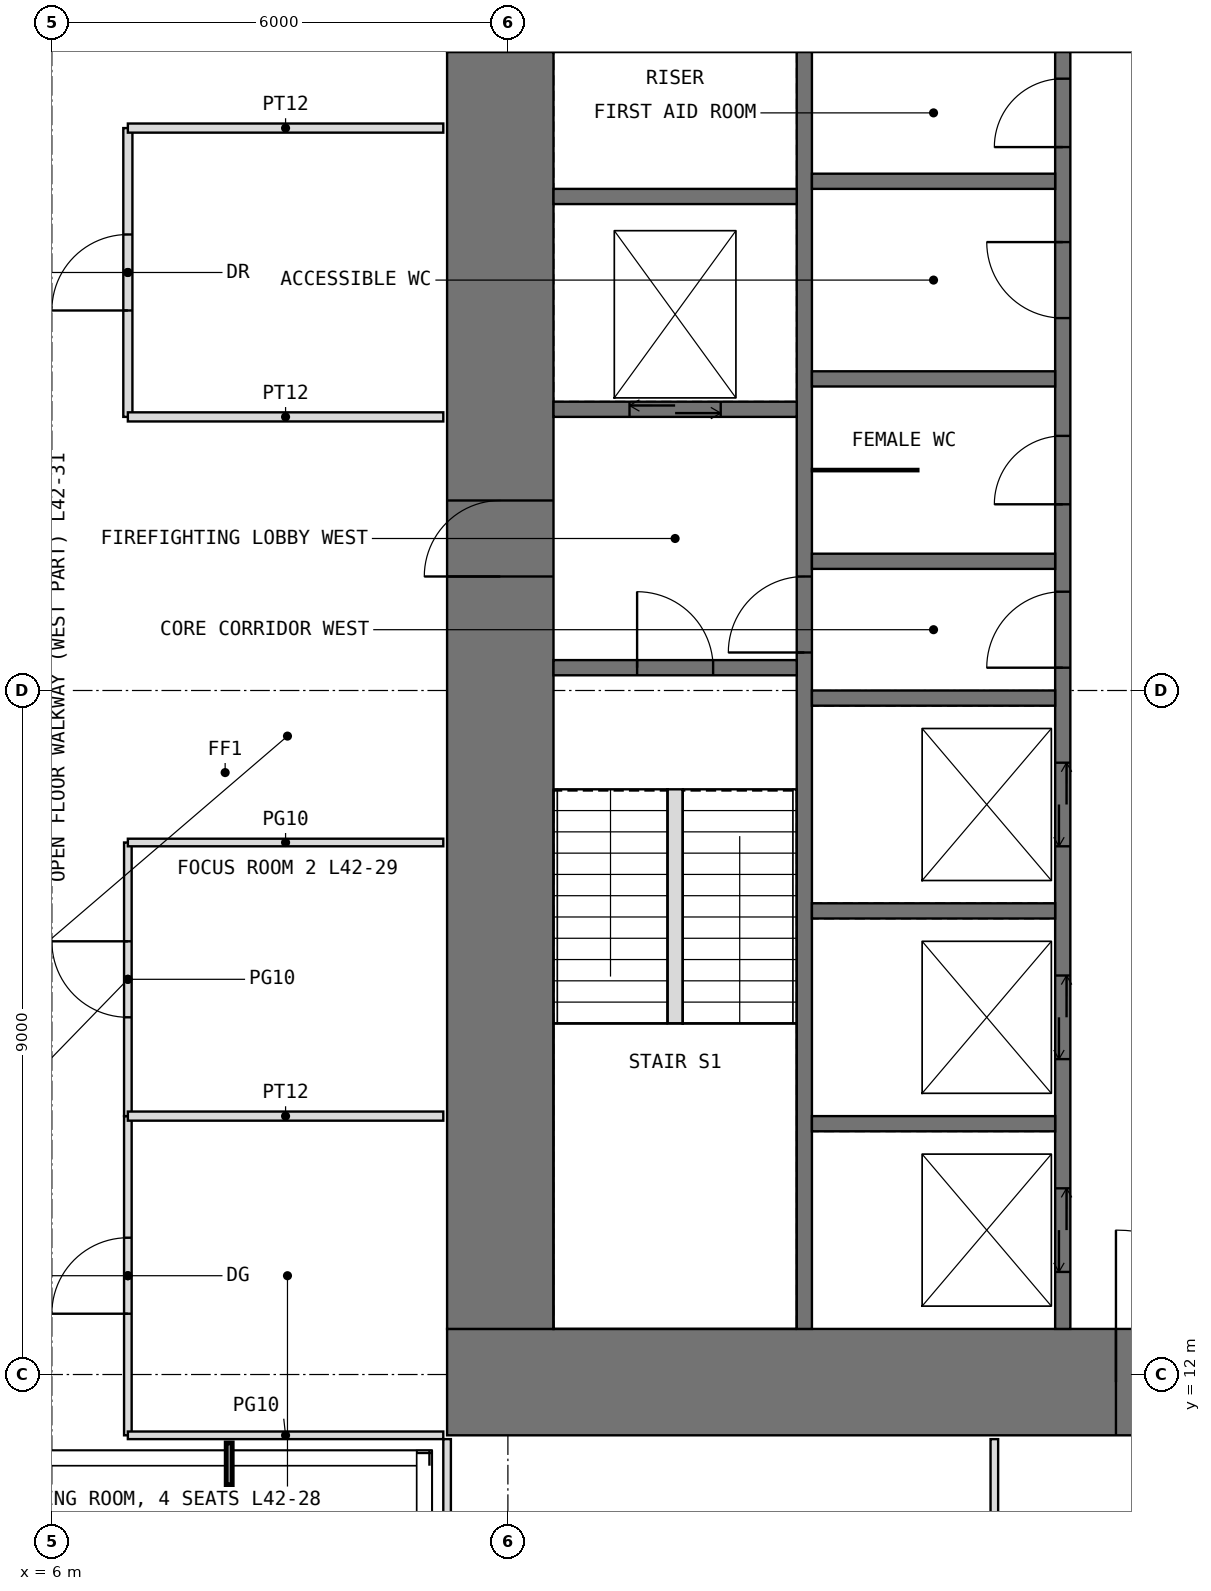
"""IFC4 building model, lengths in metres.
Left out: names, types, materials, properties, quantities, classifications, styles, units other than length and angle.
Written with IfcOpenShell. Run it as: python <this file> out.ifc"""

import sys

from ifc_helpers import new_model, si_unit, direction, frame, frame_2d, origin, place, context, subcontext, project, spatial, rectangle, extrude, element, fill, save


model = new_model("IFC4")
c1 = context("Model", 3, precision=1e-05, world=origin(), true_north=direction((0.0, 1.0)))
c2 = subcontext(c1, "Body", "Model", "MODEL_VIEW")
j1 = project(units=[si_unit("LENGTHUNIT", "METRE"), si_unit("PLANEANGLEUNIT", "RADIAN")], contexts=[c1])
p1 = place(None, origin())
s1 = spatial("IfcSite", under=j1, at=p1, CompositionType="ELEMENT")
p2 = place(p1, origin())
s2 = spatial("IfcBuilding", under=s1, at=p2, CompositionType="ELEMENT")
p3 = place(p2, frame((0.0, 0.0, 178.5)))
s3 = spatial("IfcBuildingStorey", under=s2, at=p3, CompositionType="ELEMENT", Elevation=178.5)
p4 = place(p3, frame((11.2, 11.9, -0.05), z_axis=(0.0, 0.0, 1.0), x_axis=(1.0, 0.0, 0.0)))
e1 = element("IfcWall", 1, at=p4, inside=s3, PredefinedType="SHEAR", context=c2, shape_type="SweptSolid", body=[
    extrude(rectangle(XDim=19.6, YDim=1.4, at=frame_2d((9.8, 0.0))), origin(), (0.0, 0.0, 1.0), 4.0),
])
p5 = place(p4, frame((8.8, 0.0, 0.05)))
e2 = element("IfcOpeningElement", 2, at=p5, cuts=e1, PredefinedType="OPENING", context=c2, shape_type="SweptSolid", body=[
    extrude(rectangle(XDim=2.0, YDim=2.2, at=frame_2d((1.0, 1.1))), frame((0.0, 0.71, 0.0), z_axis=(0.0, -1.0, 0.0), x_axis=(1.0, 0.0, 0.0)), (0.0, 0.0, 1.0), 1.42),
])
p6 = place(p3, frame((11.9, 12.6, -0.05), z_axis=(0.0, 0.0, 1.0), x_axis=(0.0, 1.0, 0.0)))
e3 = element("IfcWall", 3, at=p6, inside=s3, PredefinedType="SHEAR", context=c2, shape_type="SweptSolid", body=[
    extrude(rectangle(XDim=16.8, YDim=1.4, at=frame_2d((8.4, 0.0))), origin(), (0.0, 0.0, 1.0), 4.0),
])
p7 = place(p6, frame((9.9, 0.0, 0.05)))
e4 = element("IfcOpeningElement", 4, at=p7, cuts=e3, PredefinedType="OPENING", context=c2, shape_type="SweptSolid", body=[
    extrude(rectangle(XDim=1.0, YDim=2.2, at=frame_2d((0.5, 1.1))), frame((0.0, 0.71, 0.0), z_axis=(0.0, -1.0, 0.0), x_axis=(1.0, 0.0, 0.0)), (0.0, 0.0, 1.0), 1.42),
])
p8 = place(p3, frame((15.9, 12.6, -0.05), z_axis=(0.0, 0.0, 1.0), x_axis=(0.0, 1.0, 0.0)))
e5 = element("IfcWall", 5, at=p8, inside=s3, PredefinedType="SHEAR", context=c2, shape_type="SweptSolid", body=[
    extrude(rectangle(XDim=16.8, YDim=0.2, at=frame_2d((8.4, 0.0))), origin(), (0.0, 0.0, 1.0), 4.0),
])
p9 = place(p8, frame((8.9, 0.0, 0.05)))
e6 = element("IfcOpeningElement", 6, at=p9, cuts=e5, PredefinedType="OPENING", context=c2, shape_type="SweptSolid", body=[
    extrude(rectangle(XDim=1.0, YDim=2.2, at=frame_2d((0.5, 1.1))), frame((0.0, 0.11, 0.0), z_axis=(0.0, -1.0, 0.0), x_axis=(1.0, 0.0, 0.0)), (0.0, 0.0, 1.0), 0.22),
])
p10 = place(p3, frame((19.3, 12.6, -0.05), z_axis=(0.0, 0.0, 1.0), x_axis=(0.0, 1.0, 0.0)))
e7 = element("IfcWall", 7, at=p10, inside=s3, PredefinedType="SHEAR", context=c2, shape_type="SweptSolid", body=[
    extrude(rectangle(XDim=16.8, YDim=0.2, at=frame_2d((8.4, 0.0))), origin(), (0.0, 0.0, 1.0), 4.0),
])
p11 = place(p10, frame((8.7, 0.0, 0.05)))
e8 = element("IfcOpeningElement", 8, at=p11, cuts=e7, PredefinedType="OPENING", context=c2, shape_type="SweptSolid", body=[
    extrude(rectangle(XDim=1.0, YDim=2.2, at=frame_2d((0.5, 1.1))), frame((0.0, 0.11, 0.0), z_axis=(0.0, -1.0, 0.0), x_axis=(1.0, 0.0, 0.0)), (0.0, 0.0, 1.0), 0.22),
])
p12 = place(p10, frame((10.85, 0.0, 0.05)))
e9 = element("IfcOpeningElement", 9, at=p12, cuts=e7, PredefinedType="OPENING", context=c2, shape_type="SweptSolid", body=[
    extrude(rectangle(XDim=0.9, YDim=2.2, at=frame_2d((0.45, 1.1))), frame((0.0, 0.11, 0.0), z_axis=(0.0, -1.0, 0.0), x_axis=(1.0, 0.0, 0.0)), (0.0, 0.0, 1.0), 0.22),
])
p13 = place(p10, frame((13.3, 0.0, 0.05)))
e10 = element("IfcOpeningElement", 10, at=p13, cuts=e7, PredefinedType="OPENING", context=c2, shape_type="SweptSolid", body=[
    extrude(rectangle(XDim=1.0, YDim=2.2, at=frame_2d((0.5, 1.1))), frame((0.0, 0.11, 0.0), z_axis=(0.0, -1.0, 0.0), x_axis=(1.0, 0.0, 0.0)), (0.0, 0.0, 1.0), 0.22),
])
p14 = place(p10, frame((15.55, 0.0, 0.05)))
e11 = element("IfcOpeningElement", 11, at=p14, cuts=e7, PredefinedType="OPENING", context=c2, shape_type="SweptSolid", body=[
    extrude(rectangle(XDim=0.9, YDim=2.2, at=frame_2d((0.45, 1.1))), frame((0.0, 0.11, 0.0), z_axis=(0.0, -1.0, 0.0), x_axis=(1.0, 0.0, 0.0)), (0.0, 0.0, 1.0), 0.22),
])
p15 = place(p10, frame((0.75, 0.0, 0.05)))
e12 = element("IfcOpeningElement", 12, at=p15, cuts=e7, PredefinedType="OPENING", context=c2, shape_type="SweptSolid", body=[
    extrude(rectangle(XDim=1.1, YDim=2.2, at=frame_2d((0.55, 1.1))), frame((0.0, 0.11, 0.0), z_axis=(0.0, -1.0, 0.0), x_axis=(1.0, 0.0, 0.0)), (0.0, 0.0, 1.0), 0.22),
])
p16 = place(p10, frame((3.55, 0.0, 0.05)))
e13 = element("IfcOpeningElement", 13, at=p16, cuts=e7, PredefinedType="OPENING", context=c2, shape_type="SweptSolid", body=[
    extrude(rectangle(XDim=1.1, YDim=2.2, at=frame_2d((0.55, 1.1))), frame((0.0, 0.11, 0.0), z_axis=(0.0, -1.0, 0.0), x_axis=(1.0, 0.0, 0.0)), (0.0, 0.0, 1.0), 0.22),
])
p17 = place(p10, frame((6.35, 0.0, 0.05)))
e14 = element("IfcOpeningElement", 14, at=p17, cuts=e7, PredefinedType="OPENING", context=c2, shape_type="SweptSolid", body=[
    extrude(rectangle(XDim=1.1, YDim=2.2, at=frame_2d((0.55, 1.1))), frame((0.0, 0.11, 0.0), z_axis=(0.0, -1.0, 0.0), x_axis=(1.0, 0.0, 0.0)), (0.0, 0.0, 1.0), 0.22),
])
p18 = place(p3, frame((12.6, 21.3, -0.05), z_axis=(0.0, 0.0, 1.0), x_axis=(1.0, 0.0, 0.0)))
e15 = element("IfcWall", 15, at=p18, inside=s3, PredefinedType="SHEAR", context=c2, shape_type="SweptSolid", body=[
    extrude(rectangle(XDim=3.2, YDim=0.2, at=frame_2d((1.6, 0.0))), origin(), (0.0, 0.0, 1.0), 4.0),
])
p19 = place(p18, frame((1.1, 0.0, 0.05)))
e16 = element("IfcOpeningElement", 16, at=p19, cuts=e15, PredefinedType="OPENING", context=c2, shape_type="SweptSolid", body=[
    extrude(rectangle(XDim=1.0, YDim=2.2, at=frame_2d((0.5, 1.1))), frame((0.0, 0.11, 0.0), z_axis=(0.0, -1.0, 0.0), x_axis=(1.0, 0.0, 0.0)), (0.0, 0.0, 1.0), 0.22),
])
p20 = place(p3, frame((12.6, 24.7, -0.05), z_axis=(0.0, 0.0, 1.0), x_axis=(1.0, 0.0, 0.0)))
e17 = element("IfcWall", 17, at=p20, inside=s3, PredefinedType="SHEAR", context=c2, shape_type="SweptSolid", body=[
    extrude(rectangle(XDim=3.2, YDim=0.2, at=frame_2d((1.6, 0.0))), origin(), (0.0, 0.0, 1.0), 4.0),
])
p21 = place(p20, frame((1.0, 0.0, 0.05)))
e18 = element("IfcOpeningElement", 18, at=p21, cuts=e17, PredefinedType="OPENING", context=c2, shape_type="SweptSolid", body=[
    extrude(rectangle(XDim=1.2, YDim=2.2, at=frame_2d((0.6, 1.1))), frame((0.0, 0.11, 0.0), z_axis=(0.0, -1.0, 0.0), x_axis=(1.0, 0.0, 0.0)), (0.0, 0.0, 1.0), 0.22),
])
for number, where, z_axis, x_axis in (
    (19, (12.6, 27.5, -0.05), (0.0, 0.0, 1.0), (1.0, 0.0, 0.0)),
    (20, (16.0, 15.3, -0.05), (0.0, 0.0, 1.0), (1.0, 0.0, 0.0)),
    (21, (16.0, 18.1, -0.05), (0.0, 0.0, 1.0), (1.0, 0.0, 0.0)),
    (22, (16.0, 20.9, -0.05), (0.0, 0.0, 1.0), (1.0, 0.0, 0.0)),
    (23, (16.0, 22.7, -0.05), (0.0, 0.0, 1.0), (1.0, 0.0, 0.0)),
    (24, (16.0, 25.1, -0.05), (0.0, 0.0, 1.0), (1.0, 0.0, 0.0)),
    (25, (16.0, 27.7, -0.05), (0.0, 0.0, 1.0), (1.0, 0.0, 0.0)),
):
    element("IfcWall", number, at=place(p3, frame(where, z_axis=z_axis, x_axis=x_axis)), inside=s3, PredefinedType="SHEAR", context=c2, shape_type="SweptSolid", body=[
        extrude(rectangle(XDim=3.2, YDim=0.2, at=frame_2d((1.6, 0.0))), origin(), (0.0, 0.0, 1.0), 4.0),
    ])
p22 = place(p3, frame((16.0, 23.9, 0.0), z_axis=(0.0, 0.0, 1.0), x_axis=(1.0, 0.0, 0.0)))
e26 = element("IfcWall", 26, at=p22, inside=s3, PredefinedType="PARTITIONING", context=c2, shape_type="SweptSolid", body=[
    extrude(rectangle(XDim=1.4, YDim=0.03, at=frame_2d((0.7, 0.0))), origin(), (0.0, 0.0, 1.0), 3.75),
])
p23 = place(p3, frame((7.0, 11.2, 0.0), z_axis=(0.0, 0.0, 1.0), x_axis=(0.0, 1.0, 0.0)))
e27 = element("IfcWall", 27, at=p23, inside=s3, PredefinedType="PARTITIONING", context=c2, shape_type="SweptSolid", body=[
    extrude(rectangle(XDim=4.2, YDim=0.1, at=frame_2d((2.1, 0.0))), origin(), (0.0, 0.0, 1.0), 3.75),
])
p24 = place(p23, frame((1.6, 0.0, 0.0)))
e28 = element("IfcOpeningElement", 28, at=p24, cuts=e27, PredefinedType="OPENING", context=c2, shape_type="SweptSolid", body=[
    extrude(rectangle(XDim=1.0, YDim=2.4, at=frame_2d((0.5, 1.2))), frame((0.0, 0.06, 0.0), z_axis=(0.0, -1.0, 0.0), x_axis=(1.0, 0.0, 0.0)), (0.0, 0.0, 1.0), 0.12),
])
p25 = place(p3, frame((7.0, 11.2, 0.0), z_axis=(0.0, 0.0, 1.0), x_axis=(1.0, 0.0, 0.0)))
e29 = element("IfcWall", 29, at=p25, inside=s3, PredefinedType="PARTITIONING", context=c2, shape_type="SweptSolid", body=[
    extrude(rectangle(XDim=4.15, YDim=0.1, at=frame_2d((2.075, 0.0))), origin(), (0.0, 0.0, 1.0), 3.75),
])
p26 = place(p3, frame((7.0, 15.4, 0.0), z_axis=(0.0, 0.0, 1.0), x_axis=(0.0, 1.0, 0.0)))
e30 = element("IfcWall", 30, at=p26, inside=s3, PredefinedType="PARTITIONING", context=c2, shape_type="SweptSolid", body=[
    extrude(rectangle(XDim=3.6, YDim=0.1, at=frame_2d((1.8, 0.0))), origin(), (0.0, 0.0, 1.0), 3.75),
])
p27 = place(p26, frame((1.3, 0.0, 0.0)))
e31 = element("IfcOpeningElement", 31, at=p27, cuts=e30, PredefinedType="OPENING", context=c2, shape_type="SweptSolid", body=[
    extrude(rectangle(XDim=1.0, YDim=2.4, at=frame_2d((0.5, 1.2))), frame((0.0, 0.06, 0.0), z_axis=(0.0, -1.0, 0.0), x_axis=(1.0, 0.0, 0.0)), (0.0, 0.0, 1.0), 0.12),
])
p28 = place(p3, frame((7.0, 15.4, 0.0), z_axis=(0.0, 0.0, 1.0), x_axis=(1.0, 0.0, 0.0)))
e32 = element("IfcWall", 32, at=p28, inside=s3, PredefinedType="PARTITIONING", context=c2, shape_type="SweptSolid", body=[
    extrude(rectangle(XDim=4.15, YDim=0.12, at=frame_2d((2.075, 0.0))), origin(), (0.0, 0.0, 1.0), 3.75),
])
p29 = place(p3, frame((7.0, 19.0, 0.0), z_axis=(0.0, 0.0, 1.0), x_axis=(1.0, 0.0, 0.0)))
e33 = element("IfcWall", 33, at=p29, inside=s3, PredefinedType="PARTITIONING", context=c2, shape_type="SweptSolid", body=[
    extrude(rectangle(XDim=4.15, YDim=0.1, at=frame_2d((2.075, 0.0))), origin(), (0.0, 0.0, 1.0), 3.75),
])
p30 = place(p3, frame((7.0, 24.6, 0.0), z_axis=(0.0, 0.0, 1.0), x_axis=(0.0, 1.0, 0.0)))
e34 = element("IfcWall", 34, at=p30, inside=s3, PredefinedType="PARTITIONING", context=c2, shape_type="SweptSolid", body=[
    extrude(rectangle(XDim=3.8, YDim=0.12, at=frame_2d((1.9, 0.0))), origin(), (0.0, 0.0, 1.0), 3.75),
])
p31 = place(p30, frame((1.4, 0.0, 0.0)))
e35 = element("IfcOpeningElement", 35, at=p31, cuts=e34, PredefinedType="OPENING", context=c2, shape_type="SweptSolid", body=[
    extrude(rectangle(XDim=1.0, YDim=2.2, at=frame_2d((0.5, 1.1))), frame((0.0, 0.07, 0.0), z_axis=(0.0, -1.0, 0.0), x_axis=(1.0, 0.0, 0.0)), (0.0, 0.0, 1.0), 0.14),
])
for number, where, z_axis, x_axis in (
    (36, (7.0, 24.6, 0.0), (0.0, 0.0, 1.0), (1.0, 0.0, 0.0)),
    (37, (7.0, 28.4, 0.0), (0.0, 0.0, 1.0), (1.0, 0.0, 0.0)),
):
    element("IfcWall", number, at=place(p3, frame(where, z_axis=z_axis, x_axis=x_axis)), inside=s3, PredefinedType="PARTITIONING", context=c2, shape_type="SweptSolid", body=[
        extrude(rectangle(XDim=4.15, YDim=0.12, at=frame_2d((2.075, 0.0))), origin(), (0.0, 0.0, 1.0), 3.75),
    ])
for number, where, z_axis, x_axis in (
    (38, (11.2, 6.2, 0.0), (0.0, 0.0, 1.0), (0.0, 1.0, 0.0)),
    (39, (18.4, 6.2, 0.0), (0.0, 0.0, 1.0), (0.0, 1.0, 0.0)),
):
    element("IfcWall", number, at=place(p3, frame(where, z_axis=z_axis, x_axis=x_axis)), inside=s3, PredefinedType="PARTITIONING", context=c2, shape_type="SweptSolid", body=[
        extrude(rectangle(XDim=4.95, YDim=0.1, at=frame_2d((2.475, 0.0))), origin(), (0.0, 0.0, 1.0), 3.75),
    ])
p32 = place(p3, frame((14.2, 16.62, 0.0), z_axis=(0.0, 0.0, 1.0), x_axis=(0.0, 1.0, 0.0)))
e40 = element("IfcWall", 40, at=p32, inside=s3, PredefinedType="PARTITIONING", context=c2, shape_type="SweptSolid", body=[
    extrude(rectangle(XDim=3.08, YDim=0.2, at=frame_2d((1.54, 0.0))), origin(), (0.0, 0.0, 1.0), 4.0),
])
p33 = place(p5, origin())
e41 = element("IfcDoor", 41, at=p33, inside=s3, OperationType="DOUBLE_DOOR_SINGLE_SWING", PredefinedType="DOOR", context=c2, shape_type="SweptSolid", body=[
    extrude(rectangle(XDim=2.0, YDim=2.2, at=frame_2d((1.0, 1.1))), frame((0.0, 0.025, 0.0), z_axis=(0.0, -1.0, 0.0), x_axis=(1.0, 0.0, 0.0)), (0.0, 0.0, 1.0), 0.05),
])
fill(e2, e41)
p34 = place(p7, origin())
e42 = element("IfcDoor", 42, at=p34, inside=s3, OperationType="SINGLE_SWING_LEFT", PredefinedType="DOOR", context=c2, shape_type="SweptSolid", body=[
    extrude(rectangle(XDim=1.0, YDim=2.2, at=frame_2d((0.5, 1.1))), frame((0.0, 0.025, 0.0), z_axis=(0.0, -1.0, 0.0), x_axis=(1.0, 0.0, 0.0)), (0.0, 0.0, 1.0), 0.05),
])
fill(e4, e42)
p35 = place(p19, origin())
e43 = element("IfcDoor", 43, at=p35, inside=s3, OperationType="SINGLE_SWING_LEFT", PredefinedType="DOOR", context=c2, shape_type="SweptSolid", body=[
    extrude(rectangle(XDim=1.0, YDim=2.2, at=frame_2d((0.5, 1.1))), frame((0.0, 0.025, 0.0), z_axis=(0.0, -1.0, 0.0), x_axis=(1.0, 0.0, 0.0)), (0.0, 0.0, 1.0), 0.05),
])
fill(e16, e43)
p36 = place(p9, origin())
e44 = element("IfcDoor", 44, at=p36, inside=s3, OperationType="SINGLE_SWING_LEFT", PredefinedType="DOOR", context=c2, shape_type="SweptSolid", body=[
    extrude(rectangle(XDim=1.0, YDim=2.2, at=frame_2d((0.5, 1.1))), frame((0.0, 0.025, 0.0), z_axis=(0.0, -1.0, 0.0), x_axis=(1.0, 0.0, 0.0)), (0.0, 0.0, 1.0), 0.05),
])
fill(e6, e44)
p37 = place(p11, origin())
e45 = element("IfcDoor", 45, at=p37, inside=s3, OperationType="SINGLE_SWING_LEFT", PredefinedType="DOOR", context=c2, shape_type="SweptSolid", body=[
    extrude(rectangle(XDim=1.0, YDim=2.2, at=frame_2d((0.5, 1.1))), frame((0.0, 0.025, 0.0), z_axis=(0.0, -1.0, 0.0), x_axis=(1.0, 0.0, 0.0)), (0.0, 0.0, 1.0), 0.05),
])
fill(e8, e45)
p38 = place(p12, origin())
e46 = element("IfcDoor", 46, at=p38, inside=s3, OperationType="SINGLE_SWING_LEFT", PredefinedType="DOOR", context=c2, shape_type="SweptSolid", body=[
    extrude(rectangle(XDim=0.9, YDim=2.2, at=frame_2d((0.45, 1.1))), frame((0.0, 0.025, 0.0), z_axis=(0.0, -1.0, 0.0), x_axis=(1.0, 0.0, 0.0)), (0.0, 0.0, 1.0), 0.05),
])
fill(e9, e46)
p39 = place(p13, origin())
e47 = element("IfcDoor", 47, at=p39, inside=s3, OperationType="SINGLE_SWING_RIGHT", PredefinedType="DOOR", context=c2, shape_type="SweptSolid", body=[
    extrude(rectangle(XDim=1.0, YDim=2.2, at=frame_2d((0.5, 1.1))), frame((0.0, 0.025, 0.0), z_axis=(0.0, -1.0, 0.0), x_axis=(1.0, 0.0, 0.0)), (0.0, 0.0, 1.0), 0.05),
])
fill(e10, e47)
p40 = place(p14, origin())
e48 = element("IfcDoor", 48, at=p40, inside=s3, OperationType="SINGLE_SWING_LEFT", PredefinedType="DOOR", context=c2, shape_type="SweptSolid", body=[
    extrude(rectangle(XDim=0.9, YDim=2.2, at=frame_2d((0.45, 1.1))), frame((0.0, 0.025, 0.0), z_axis=(0.0, -1.0, 0.0), x_axis=(1.0, 0.0, 0.0)), (0.0, 0.0, 1.0), 0.05),
])
fill(e11, e48)
p41 = place(p24, origin())
e49 = element("IfcDoor", 49, at=p41, inside=s3, OperationType="SINGLE_SWING_LEFT", PredefinedType="DOOR", context=c2, shape_type="SweptSolid", body=[
    extrude(rectangle(XDim=1.0, YDim=2.4, at=frame_2d((0.5, 1.2))), frame((0.0, 0.025, 0.0), z_axis=(0.0, -1.0, 0.0), x_axis=(1.0, 0.0, 0.0)), (0.0, 0.0, 1.0), 0.05),
])
fill(e28, e49)
p42 = place(p27, origin())
e50 = element("IfcDoor", 50, at=p42, inside=s3, OperationType="SINGLE_SWING_RIGHT", PredefinedType="DOOR", context=c2, shape_type="SweptSolid", body=[
    extrude(rectangle(XDim=1.0, YDim=2.4, at=frame_2d((0.5, 1.2))), frame((0.0, 0.025, 0.0), z_axis=(0.0, -1.0, 0.0), x_axis=(1.0, 0.0, 0.0)), (0.0, 0.0, 1.0), 0.05),
])
fill(e31, e50)
p43 = place(p31, origin())
e51 = element("IfcDoor", 51, at=p43, inside=s3, OperationType="SINGLE_SWING_LEFT", PredefinedType="DOOR", context=c2, shape_type="SweptSolid", body=[
    extrude(rectangle(XDim=1.0, YDim=2.2, at=frame_2d((0.5, 1.1))), frame((0.0, 0.025, 0.0), z_axis=(0.0, -1.0, 0.0), x_axis=(1.0, 0.0, 0.0)), (0.0, 0.0, 1.0), 0.05),
])
fill(e35, e51)
p44 = place(p15, origin())
e52 = element("IfcDoor", 52, at=p44, inside=s3, OperationType="DOUBLE_DOOR_SLIDING", PredefinedType="DOOR", context=c2, shape_type="SweptSolid", body=[
    extrude(rectangle(XDim=1.1, YDim=2.2, at=frame_2d((0.55, 1.1))), frame((0.0, 0.025, 0.0), z_axis=(0.0, -1.0, 0.0), x_axis=(1.0, 0.0, 0.0)), (0.0, 0.0, 1.0), 0.05),
])
fill(e12, e52)
p45 = place(p16, origin())
e53 = element("IfcDoor", 53, at=p45, inside=s3, OperationType="DOUBLE_DOOR_SLIDING", PredefinedType="DOOR", context=c2, shape_type="SweptSolid", body=[
    extrude(rectangle(XDim=1.1, YDim=2.2, at=frame_2d((0.55, 1.1))), frame((0.0, 0.025, 0.0), z_axis=(0.0, -1.0, 0.0), x_axis=(1.0, 0.0, 0.0)), (0.0, 0.0, 1.0), 0.05),
])
fill(e13, e53)
p46 = place(p17, origin())
e54 = element("IfcDoor", 54, at=p46, inside=s3, OperationType="DOUBLE_DOOR_SLIDING", PredefinedType="DOOR", context=c2, shape_type="SweptSolid", body=[
    extrude(rectangle(XDim=1.1, YDim=2.2, at=frame_2d((0.55, 1.1))), frame((0.0, 0.025, 0.0), z_axis=(0.0, -1.0, 0.0), x_axis=(1.0, 0.0, 0.0)), (0.0, 0.0, 1.0), 0.05),
])
fill(e14, e54)
p47 = place(p21, origin())
e55 = element("IfcDoor", 55, at=p47, inside=s3, OperationType="DOUBLE_DOOR_SLIDING", PredefinedType="DOOR", context=c2, shape_type="SweptSolid", body=[
    extrude(rectangle(XDim=1.2, YDim=2.2, at=frame_2d((0.6, 1.1))), frame((0.0, 0.025, 0.0), z_axis=(0.0, -1.0, 0.0), x_axis=(1.0, 0.0, 0.0)), (0.0, 0.0, 1.0), 0.05),
])
fill(e18, e55)
save(model, sys.argv[1])
